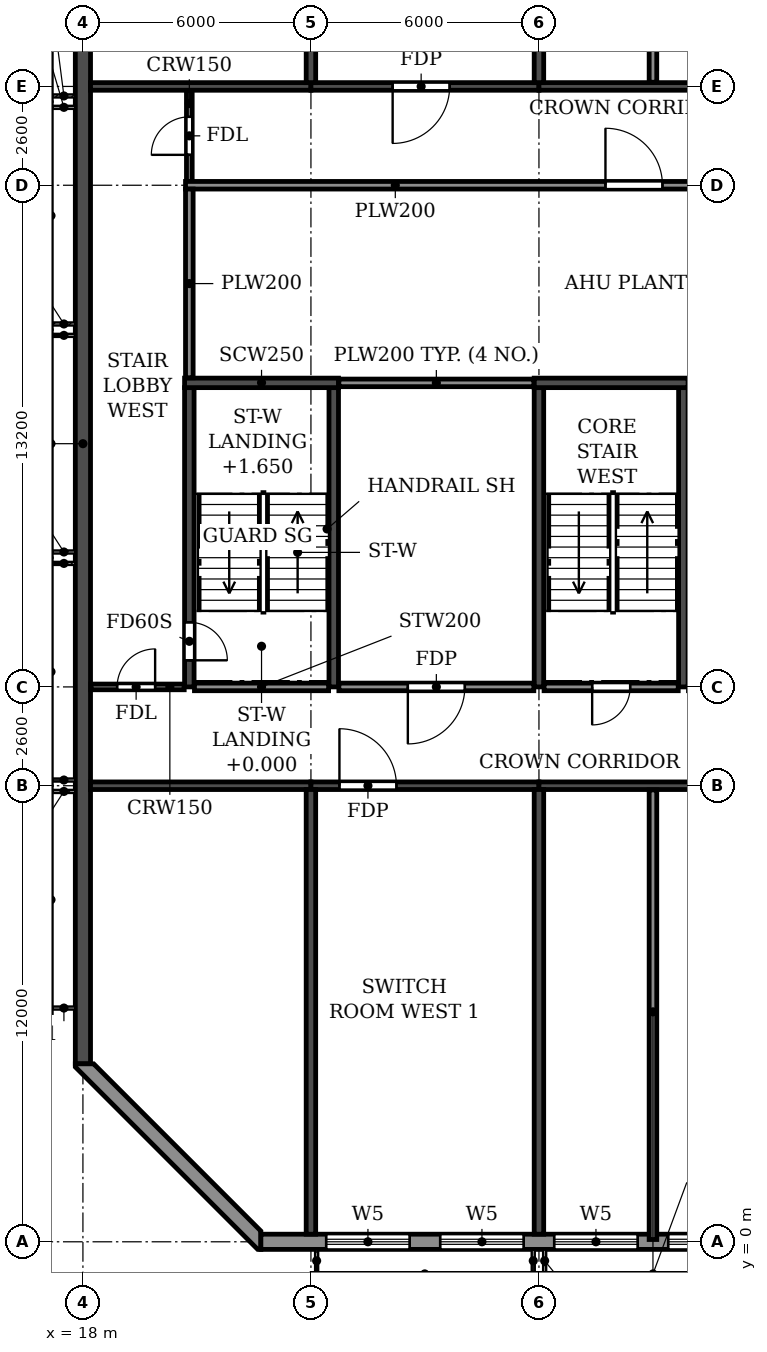
"""IFC4 building model, lengths in metres.
Left out: names, types, materials, properties, quantities, classifications, styles, units other than length and angle.
Written with IfcOpenShell. Run it as: python <this file> out.ifc"""

import sys

from ifc_helpers import new_model, si_unit, direction, frame, frame_2d, origin, place, context, subcontext, project, spatial, polyline, rectangle, outline, extrude, element, fill, save


model = new_model("IFC4")
c1 = context("Model", 3, precision=1e-05, world=origin(), true_north=direction((0.0, 1.0)))
c2 = subcontext(c1, "Body", "Model", "MODEL_VIEW")
j1 = project(units=[si_unit("LENGTHUNIT", "METRE"), si_unit("PLANEANGLEUNIT", "RADIAN")], contexts=[c1])
p1 = place(None, origin())
s1 = spatial("IfcSite", under=j1, at=p1, CompositionType="ELEMENT")
p2 = place(p1, origin())
s2 = spatial("IfcBuilding", under=s1, at=p2, CompositionType="ELEMENT")
p3 = place(p2, frame((0.0, 0.0, 282.3)))
s3 = spatial("IfcBuildingStorey", under=s2, at=p3, CompositionType="ELEMENT", Elevation=282.3)
p4 = place(p3, frame((24.0, 0.2, 0.0), z_axis=(0.0, 0.0, 1.0), x_axis=(0.0, 1.0, 0.0)))
e1 = element("IfcWall", 1, at=p4, inside=s3, PredefinedType="SHEAR", context=c2, shape_type="SweptSolid", body=[
    extrude(rectangle(XDim=11.7, YDim=0.25, at=frame_2d((5.85, 0.0))), origin(), (0.0, 0.0, 1.0), 3.05),
])
p5 = place(p3, frame((24.0, 30.5, 0.0), z_axis=(0.0, 0.0, 1.0), x_axis=(0.0, 1.0, 0.0)))
e2 = element("IfcWall", 2, at=p5, inside=s3, PredefinedType="SHEAR", context=c2, shape_type="SweptSolid", body=[
    extrude(rectangle(XDim=10.5, YDim=0.25, at=frame_2d((5.25, 0.0))), origin(), (0.0, 0.0, 1.0), 3.05),
])
p6 = place(p3, frame((30.0, 0.2, 0.0), z_axis=(0.0, 0.0, 1.0), x_axis=(0.0, 1.0, 0.0)))
e3 = element("IfcWall", 3, at=p6, inside=s3, PredefinedType="SHEAR", context=c2, shape_type="SweptSolid", body=[
    extrude(rectangle(XDim=11.7, YDim=0.25, at=frame_2d((5.85, 0.0))), origin(), (0.0, 0.0, 1.0), 3.05),
])
p7 = place(p3, frame((30.0, 30.5, 0.0), z_axis=(0.0, 0.0, 1.0), x_axis=(0.0, 1.0, 0.0)))
e4 = element("IfcWall", 4, at=p7, inside=s3, PredefinedType="SHEAR", context=c2, shape_type="SweptSolid", body=[
    extrude(rectangle(XDim=10.5, YDim=0.25, at=frame_2d((5.25, 0.0))), origin(), (0.0, 0.0, 1.0), 3.05),
])
p8 = place(p3, frame((18.0, 4.683, 0.0), z_axis=(0.0, 0.0, 1.0), x_axis=(0.0, 1.0, 0.0)))
e5 = element("IfcWall", 5, at=p8, inside=s3, PredefinedType="SHEAR", context=c2, shape_type="SweptSolid", body=[
    extrude(rectangle(XDim=31.834, YDim=0.4, at=frame_2d((15.917, 0.0))), origin(), (0.0, 0.0, 1.0), 3.05),
])
p9 = place(p3, frame((18.2, 12.0, 0.0), z_axis=(0.0, 0.0, 1.0), x_axis=(1.0, 0.0, 0.0)))
e6 = element("IfcWall", 6, at=p9, inside=s3, PredefinedType="SHEAR", context=c2, shape_type="SweptSolid", body=[
    extrude(rectangle(XDim=5.8, YDim=0.2, at=frame_2d((2.9, 0.0))), origin(), (0.0, 0.0, 1.0), 2.45),
])
p10 = place(p3, frame((24.0, 12.0, 0.0), z_axis=(0.0, 0.0, 1.0), x_axis=(1.0, 0.0, 0.0)))
e7 = element("IfcWall", 7, at=p10, inside=s3, PredefinedType="SHEAR", context=c2, shape_type="SweptSolid", body=[
    extrude(rectangle(XDim=6.0, YDim=0.2, at=frame_2d((3.0, 0.0))), origin(), (0.0, 0.0, 1.0), 2.45),
])
p11 = place(p10, frame((0.75, 0.0, 0.0)))
e8 = element("IfcOpeningElement", 8, at=p11, cuts=e7, PredefinedType="OPENING", context=c2, shape_type="SweptSolid", body=[
    extrude(rectangle(XDim=1.5, YDim=2.1, at=frame_2d((0.75, 1.05))), frame((0.0, 0.11, 0.0), z_axis=(0.0, -1.0, 0.0), x_axis=(1.0, 0.0, 0.0)), (0.0, 0.0, 1.0), 0.22),
])
p12 = place(p3, frame((30.0, 12.0, 0.0), z_axis=(0.0, 0.0, 1.0), x_axis=(1.0, 0.0, 0.0)))
e9 = element("IfcWall", 9, at=p12, inside=s3, PredefinedType="SHEAR", context=c2, shape_type="SweptSolid", body=[
    extrude(rectangle(XDim=6.0, YDim=0.2, at=frame_2d((3.0, 0.0))), origin(), (0.0, 0.0, 1.0), 2.45),
])
p13 = place(p3, frame((18.2, 30.4, 0.0), z_axis=(0.0, 0.0, 1.0), x_axis=(1.0, 0.0, 0.0)))
e10 = element("IfcWall", 10, at=p13, inside=s3, PredefinedType="SHEAR", context=c2, shape_type="SweptSolid", body=[
    extrude(rectangle(XDim=5.8, YDim=0.2, at=frame_2d((2.9, 0.0))), origin(), (0.0, 0.0, 1.0), 2.45),
])
p14 = place(p3, frame((24.0, 30.4, 0.0), z_axis=(0.0, 0.0, 1.0), x_axis=(1.0, 0.0, 0.0)))
e11 = element("IfcWall", 11, at=p14, inside=s3, PredefinedType="SHEAR", context=c2, shape_type="SweptSolid", body=[
    extrude(rectangle(XDim=6.0, YDim=0.2, at=frame_2d((3.0, 0.0))), origin(), (0.0, 0.0, 1.0), 2.45),
])
p15 = place(p14, frame((2.15, 0.0, 0.0)))
e12 = element("IfcOpeningElement", 12, at=p15, cuts=e11, PredefinedType="OPENING", context=c2, shape_type="SweptSolid", body=[
    extrude(rectangle(XDim=1.5, YDim=2.1, at=frame_2d((0.75, 1.05))), frame((0.0, 0.11, 0.0), z_axis=(0.0, -1.0, 0.0), x_axis=(1.0, 0.0, 0.0)), (0.0, 0.0, 1.0), 0.22),
])
p16 = place(p3, frame((30.0, 30.4, 0.0), z_axis=(0.0, 0.0, 1.0), x_axis=(1.0, 0.0, 0.0)))
e13 = element("IfcWall", 13, at=p16, inside=s3, PredefinedType="SHEAR", context=c2, shape_type="SweptSolid", body=[
    extrude(rectangle(XDim=6.0, YDim=0.2, at=frame_2d((3.0, 0.0))), origin(), (0.0, 0.0, 1.0), 2.45),
])
p17 = place(p3, frame((20.8, 14.6, 0.0), z_axis=(0.0, 0.0, 1.0), x_axis=(0.0, 1.0, 0.0)))
e14 = element("IfcWall", 14, at=p17, inside=s3, PredefinedType="SOLIDWALL", context=c2, shape_type="SweptSolid", body=[
    extrude(rectangle(XDim=7.875, YDim=0.25, at=frame_2d((3.938, 0.0))), origin(), (0.0, 0.0, 1.0), 3.05),
])
p18 = place(p17, frame((0.7, 0.0, 0.0)))
e15 = element("IfcOpeningElement", 15, at=p18, cuts=e14, PredefinedType="OPENING", context=c2, shape_type="SweptSolid", body=[
    extrude(rectangle(XDim=1.0, YDim=2.1, at=frame_2d((0.5, 1.05))), frame((0.0, 0.135, 0.0), z_axis=(0.0, -1.0, 0.0), x_axis=(1.0, 0.0, 0.0)), (0.0, 0.0, 1.0), 0.27),
])
p19 = place(p3, frame((24.6, 14.6, 0.0), z_axis=(0.0, 0.0, 1.0), x_axis=(0.0, 1.0, 0.0)))
e16 = element("IfcWall", 16, at=p19, inside=s3, PredefinedType="SOLIDWALL", context=c2, shape_type="SweptSolid", body=[
    extrude(rectangle(XDim=7.875, YDim=0.25, at=frame_2d((3.938, 0.0))), origin(), (0.0, 0.0, 1.0), 3.05),
])
p20 = place(p3, frame((20.675, 22.6, 0.0), z_axis=(0.0, 0.0, 1.0), x_axis=(1.0, 0.0, 0.0)))
e17 = element("IfcWall", 17, at=p20, inside=s3, PredefinedType="SOLIDWALL", context=c2, shape_type="SweptSolid", body=[
    extrude(rectangle(XDim=4.05, YDim=0.25, at=frame_2d((2.025, 0.0))), origin(), (0.0, 0.0, 1.0), 3.05),
])
for number, where, z_axis, x_axis in (
    (18, (30.0, 14.6, 0.0), (0.0, 0.0, 1.0), (0.0, 1.0, 0.0)),
    (19, (33.8, 14.6, 0.0), (0.0, 0.0, 1.0), (0.0, 1.0, 0.0)),
):
    element("IfcWall", number, at=place(p3, frame(where, z_axis=z_axis, x_axis=x_axis)), inside=s3, PredefinedType="SOLIDWALL", context=c2, shape_type="SweptSolid", body=[
        extrude(rectangle(XDim=7.875, YDim=0.25, at=frame_2d((3.938, 0.0))), origin(), (0.0, 0.0, 1.0), 3.05),
    ])
p21 = place(p3, frame((29.875, 22.6, 0.0), z_axis=(0.0, 0.0, 1.0), x_axis=(1.0, 0.0, 0.0)))
e20 = element("IfcWall", 20, at=p21, inside=s3, PredefinedType="SOLIDWALL", context=c2, shape_type="SweptSolid", body=[
    extrude(rectangle(XDim=4.05, YDim=0.25, at=frame_2d((2.025, 0.0))), origin(), (0.0, 0.0, 1.0), 3.05),
])
p22 = place(p3, frame((22.683, 0.0, 0.0), z_axis=(0.0, 0.0, 1.0), x_axis=(1.0, 0.0, 0.0)))
e21 = element("IfcWall", 21, at=p22, inside=s3, PredefinedType="STANDARD", context=c2, shape_type="SweptSolid", body=[
    extrude(rectangle(XDim=25.517, YDim=0.4, at=frame_2d((12.759, 0.0))), origin(), (0.0, 0.0, 1.0), 3.05),
])
p23 = place(p22, frame((1.717, 0.0, 0.6)))
e22 = element("IfcOpeningElement", 22, at=p23, cuts=e21, PredefinedType="OPENING", context=c2, shape_type="SweptSolid", body=[
    extrude(rectangle(XDim=2.2, YDim=2.4, at=frame_2d((1.1, 1.2))), frame((0.0, 0.21, 0.0), z_axis=(0.0, -1.0, 0.0), x_axis=(1.0, 0.0, 0.0)), (0.0, 0.0, 1.0), 0.42),
])
p24 = place(p22, frame((4.717, 0.0, 0.6)))
e23 = element("IfcOpeningElement", 23, at=p24, cuts=e21, PredefinedType="OPENING", context=c2, shape_type="SweptSolid", body=[
    extrude(rectangle(XDim=2.2, YDim=2.4, at=frame_2d((1.1, 1.2))), frame((0.0, 0.21, 0.0), z_axis=(0.0, -1.0, 0.0), x_axis=(1.0, 0.0, 0.0)), (0.0, 0.0, 1.0), 0.42),
])
p25 = place(p22, frame((7.717, 0.0, 0.6)))
e24 = element("IfcOpeningElement", 24, at=p25, cuts=e21, PredefinedType="OPENING", context=c2, shape_type="SweptSolid", body=[
    extrude(rectangle(XDim=2.2, YDim=2.4, at=frame_2d((1.1, 1.2))), frame((0.0, 0.21, 0.0), z_axis=(0.0, -1.0, 0.0), x_axis=(1.0, 0.0, 0.0)), (0.0, 0.0, 1.0), 0.42),
])
p26 = place(p22, frame((10.717, 0.0, 0.6)))
e25 = element("IfcOpeningElement", 25, at=p26, cuts=e21, PredefinedType="OPENING", context=c2, shape_type="SweptSolid", body=[
    extrude(rectangle(XDim=2.2, YDim=2.4, at=frame_2d((1.1, 1.2))), frame((0.0, 0.21, 0.0), z_axis=(0.0, -1.0, 0.0), x_axis=(1.0, 0.0, 0.0)), (0.0, 0.0, 1.0), 0.42),
])
p27 = place(p22, frame((13.717, 0.0, 0.6)))
e26 = element("IfcOpeningElement", 26, at=p27, cuts=e21, PredefinedType="OPENING", context=c2, shape_type="SweptSolid", body=[
    extrude(rectangle(XDim=2.2, YDim=2.4, at=frame_2d((1.1, 1.2))), frame((0.0, 0.21, 0.0), z_axis=(0.0, -1.0, 0.0), x_axis=(1.0, 0.0, 0.0)), (0.0, 0.0, 1.0), 0.42),
])
p28 = place(p22, frame((16.717, 0.0, 0.6)))
e27 = element("IfcOpeningElement", 27, at=p28, cuts=e21, PredefinedType="OPENING", context=c2, shape_type="SweptSolid", body=[
    extrude(rectangle(XDim=2.2, YDim=2.4, at=frame_2d((1.1, 1.2))), frame((0.0, 0.21, 0.0), z_axis=(0.0, -1.0, 0.0), x_axis=(1.0, 0.0, 0.0)), (0.0, 0.0, 1.0), 0.42),
])
p29 = place(p22, frame((19.717, 0.0, 0.6)))
e28 = element("IfcOpeningElement", 28, at=p29, cuts=e21, PredefinedType="OPENING", context=c2, shape_type="SweptSolid", body=[
    extrude(rectangle(XDim=2.2, YDim=2.4, at=frame_2d((1.1, 1.2))), frame((0.0, 0.21, 0.0), z_axis=(0.0, -1.0, 0.0), x_axis=(1.0, 0.0, 0.0)), (0.0, 0.0, 1.0), 0.42),
])
p30 = place(p22, frame((22.717, 0.0, 0.6)))
e29 = element("IfcOpeningElement", 29, at=p30, cuts=e21, PredefinedType="OPENING", context=c2, shape_type="SweptSolid", body=[
    extrude(rectangle(XDim=2.2, YDim=2.4, at=frame_2d((1.1, 1.2))), frame((0.0, 0.21, 0.0), z_axis=(0.0, -1.0, 0.0), x_axis=(1.0, 0.0, 0.0)), (0.0, 0.0, 1.0), 0.42),
])
p31 = place(p3, origin())
e30 = element("IfcWall", 30, at=p31, inside=s3, PredefinedType="STANDARD", context=c2, shape_type="SweptSolid", body=[
    extrude(outline(polyline([(17.8, 4.683), (17.8, 4.6), (22.6, -0.2), (22.683, -0.2), (22.683, 0.283), (18.283, 4.683), (17.8, 4.683)])), origin(), (0.0, 0.0, 1.0), 3.05),
])
p32 = place(p3, frame((18.21, 14.6, 0.0), z_axis=(0.0, 0.0, 1.0), x_axis=(1.0, 0.0, 0.0)))
e31 = element("IfcWall", 31, at=p32, inside=s3, PredefinedType="PARTITIONING", context=c2, shape_type="SweptSolid", body=[
    extrude(rectangle(XDim=2.455, YDim=0.15, at=frame_2d((1.228, 0.0))), origin(), (0.0, 0.0, 1.0), 3.05),
])
p33 = place(p32, frame((0.69, 0.0, 0.0)))
e32 = element("IfcOpeningElement", 32, at=p33, cuts=e31, PredefinedType="OPENING", context=c2, shape_type="SweptSolid", body=[
    extrude(rectangle(XDim=1.0, YDim=2.1, at=frame_2d((0.5, 1.05))), frame((0.0, 0.085, 0.0), z_axis=(0.0, -1.0, 0.0), x_axis=(1.0, 0.0, 0.0)), (0.0, 0.0, 1.0), 0.17),
])
p34 = place(p3, frame((20.8, 27.9, 0.0), z_axis=(0.0, 0.0, 1.0), x_axis=(0.0, 1.0, 0.0)))
e33 = element("IfcWall", 33, at=p34, inside=s3, PredefinedType="PARTITIONING", context=c2, shape_type="SweptSolid", body=[
    extrude(rectangle(XDim=2.39, YDim=0.15, at=frame_2d((1.195, 0.0))), origin(), (0.0, 0.0, 1.0), 3.05),
])
p35 = place(p34, frame((0.7, 0.0, 0.0)))
e34 = element("IfcOpeningElement", 34, at=p35, cuts=e33, PredefinedType="OPENING", context=c2, shape_type="SweptSolid", body=[
    extrude(rectangle(XDim=1.0, YDim=2.1, at=frame_2d((0.5, 1.05))), frame((0.0, 0.085, 0.0), z_axis=(0.0, -1.0, 0.0), x_axis=(1.0, 0.0, 0.0)), (0.0, 0.0, 1.0), 0.17),
])
p36 = place(p3, frame((24.735, 14.6, 0.0), z_axis=(0.0, 0.0, 1.0), x_axis=(1.0, 0.0, 0.0)))
e35 = element("IfcWall", 35, at=p36, inside=s3, PredefinedType="PARTITIONING", context=c2, shape_type="SweptSolid", body=[
    extrude(rectangle(XDim=5.13, YDim=0.2, at=frame_2d((2.565, 0.0))), origin(), (0.0, 0.0, 1.0), 3.05),
])
p37 = place(p36, frame((1.815, 0.0, 0.0)))
e36 = element("IfcOpeningElement", 36, at=p37, cuts=e35, PredefinedType="OPENING", context=c2, shape_type="SweptSolid", body=[
    extrude(rectangle(XDim=1.5, YDim=2.1, at=frame_2d((0.75, 1.05))), frame((0.0, 0.11, 0.0), z_axis=(0.0, -1.0, 0.0), x_axis=(1.0, 0.0, 0.0)), (0.0, 0.0, 1.0), 0.22),
])
p38 = place(p3, frame((24.735, 22.6, 0.0), z_axis=(0.0, 0.0, 1.0), x_axis=(1.0, 0.0, 0.0)))
e37 = element("IfcWall", 37, at=p38, inside=s3, PredefinedType="PARTITIONING", context=c2, shape_type="SweptSolid", body=[
    extrude(rectangle(XDim=5.13, YDim=0.2, at=frame_2d((2.565, 0.0))), origin(), (0.0, 0.0, 1.0), 3.05),
])
p39 = place(p3, frame((20.7, 27.8, 0.0), z_axis=(0.0, 0.0, 1.0), x_axis=(1.0, 0.0, 0.0)))
e38 = element("IfcWall", 38, at=p39, inside=s3, PredefinedType="PARTITIONING", context=c2, shape_type="SweptSolid", body=[
    extrude(rectangle(XDim=23.6, YDim=0.2, at=frame_2d((11.8, 0.0))), origin(), (0.0, 0.0, 1.0), 3.05),
])
p40 = place(p39, frame((11.05, 0.0, 0.0)))
e39 = element("IfcOpeningElement", 39, at=p40, cuts=e38, PredefinedType="OPENING", context=c2, shape_type="SweptSolid", body=[
    extrude(rectangle(XDim=1.5, YDim=2.1, at=frame_2d((0.75, 1.05))), frame((0.0, 0.11, 0.0), z_axis=(0.0, -1.0, 0.0), x_axis=(1.0, 0.0, 0.0)), (0.0, 0.0, 1.0), 0.22),
])
p41 = place(p3, frame((20.8, 22.735, 0.0), z_axis=(0.0, 0.0, 1.0), x_axis=(0.0, 1.0, 0.0)))
e40 = element("IfcWall", 40, at=p41, inside=s3, PredefinedType="PARTITIONING", context=c2, shape_type="SweptSolid", body=[
    extrude(rectangle(XDim=4.965, YDim=0.2, at=frame_2d((2.482, 0.0))), origin(), (0.0, 0.0, 1.0), 3.05),
])
p42 = place(p3, frame((33.0, 0.06, 0.0), z_axis=(0.0, 0.0, 1.0), x_axis=(0.0, 1.0, 0.0)))
e41 = element("IfcWall", 41, at=p42, inside=s3, PredefinedType="PARTITIONING", context=c2, shape_type="SweptSolid", body=[
    extrude(rectangle(XDim=11.83, YDim=0.2, at=frame_2d((5.915, 0.0))), origin(), (0.0, 0.0, 1.0), 3.05),
])
p43 = place(p3, frame((33.0, 30.51, 0.0), z_axis=(0.0, 0.0, 1.0), x_axis=(0.0, 1.0, 0.0)))
e42 = element("IfcWall", 42, at=p43, inside=s3, PredefinedType="PARTITIONING", context=c2, shape_type="SweptSolid", body=[
    extrude(rectangle(XDim=10.63, YDim=0.2, at=frame_2d((5.315, 0.0))), origin(), (0.0, 0.0, 1.0), 3.05),
])
p44 = place(p3, frame((20.935, 14.6, 0.0), z_axis=(0.0, 0.0, 1.0), x_axis=(1.0, 0.0, 0.0)))
e43 = element("IfcWall", 43, at=p44, inside=s3, PredefinedType="PARTITIONING", context=c2, shape_type="SweptSolid", body=[
    extrude(rectangle(XDim=3.53, YDim=0.2, at=frame_2d((1.765, 0.0))), origin(), (0.0, 0.0, 1.0), 3.05),
])
p45 = place(p3, frame((30.135, 14.6, 0.0), z_axis=(0.0, 0.0, 1.0), x_axis=(1.0, 0.0, 0.0)))
e44 = element("IfcWall", 44, at=p45, inside=s3, PredefinedType="PARTITIONING", context=c2, shape_type="SweptSolid", body=[
    extrude(rectangle(XDim=3.53, YDim=0.2, at=frame_2d((1.765, 0.0))), origin(), (0.0, 0.0, 1.0), 3.05),
])
p46 = place(p45, frame((1.265, 0.0, 0.0)))
e45 = element("IfcOpeningElement", 45, at=p46, cuts=e44, PredefinedType="OPENING", context=c2, shape_type="SweptSolid", body=[
    extrude(rectangle(XDim=1.0, YDim=2.1, at=frame_2d((0.5, 1.05))), frame((0.0, 0.11, 0.0), z_axis=(0.0, -1.0, 0.0), x_axis=(1.0, 0.0, 0.0)), (0.0, 0.0, 1.0), 0.22),
])
p47 = place(p23, origin())
e46 = element("IfcWindow", 46, at=p47, inside=s3, PartitioningType="TRIPLE_PANEL_HORIZONTAL", PredefinedType="WINDOW", context=c2, shape_type="SweptSolid", body=[
    extrude(rectangle(XDim=2.2, YDim=2.4, at=frame_2d((1.1, 1.2))), frame((0.0, 0.03, 0.0), z_axis=(0.0, -1.0, 0.0), x_axis=(1.0, 0.0, 0.0)), (0.0, 0.0, 1.0), 0.06),
])
fill(e22, e46)
p48 = place(p24, origin())
e47 = element("IfcWindow", 47, at=p48, inside=s3, PartitioningType="TRIPLE_PANEL_HORIZONTAL", PredefinedType="WINDOW", context=c2, shape_type="SweptSolid", body=[
    extrude(rectangle(XDim=2.2, YDim=2.4, at=frame_2d((1.1, 1.2))), frame((0.0, 0.03, 0.0), z_axis=(0.0, -1.0, 0.0), x_axis=(1.0, 0.0, 0.0)), (0.0, 0.0, 1.0), 0.06),
])
fill(e23, e47)
p49 = place(p25, origin())
e48 = element("IfcWindow", 48, at=p49, inside=s3, PartitioningType="TRIPLE_PANEL_HORIZONTAL", PredefinedType="WINDOW", context=c2, shape_type="SweptSolid", body=[
    extrude(rectangle(XDim=2.2, YDim=2.4, at=frame_2d((1.1, 1.2))), frame((0.0, 0.03, 0.0), z_axis=(0.0, -1.0, 0.0), x_axis=(1.0, 0.0, 0.0)), (0.0, 0.0, 1.0), 0.06),
])
fill(e24, e48)
p50 = place(p26, origin())
e49 = element("IfcWindow", 49, at=p50, inside=s3, PartitioningType="TRIPLE_PANEL_HORIZONTAL", PredefinedType="WINDOW", context=c2, shape_type="SweptSolid", body=[
    extrude(rectangle(XDim=2.2, YDim=2.4, at=frame_2d((1.1, 1.2))), frame((0.0, 0.03, 0.0), z_axis=(0.0, -1.0, 0.0), x_axis=(1.0, 0.0, 0.0)), (0.0, 0.0, 1.0), 0.06),
])
fill(e25, e49)
p51 = place(p15, frame((1.5, 0.0, 0.0), z_axis=(0.0, 0.0, 1.0), x_axis=(-1.0, 0.0, 0.0)))
e50 = element("IfcDoor", 50, at=p51, inside=s3, OperationType="DOUBLE_DOOR_SINGLE_SWING", PredefinedType="DOOR", context=c2, shape_type="SweptSolid", body=[
    extrude(rectangle(XDim=1.5, YDim=2.1, at=frame_2d((0.75, 1.05))), frame((0.0, 0.025, 0.0), z_axis=(0.0, -1.0, 0.0), x_axis=(1.0, 0.0, 0.0)), (0.0, 0.0, 1.0), 0.05),
])
fill(e12, e50)
p52 = place(p40, origin())
e51 = element("IfcDoor", 51, at=p52, inside=s3, OperationType="DOUBLE_DOOR_SINGLE_SWING", PredefinedType="DOOR", context=c2, shape_type="SweptSolid", body=[
    extrude(rectangle(XDim=1.5, YDim=2.1, at=frame_2d((0.75, 1.05))), frame((0.0, 0.025, 0.0), z_axis=(0.0, -1.0, 0.0), x_axis=(1.0, 0.0, 0.0)), (0.0, 0.0, 1.0), 0.05),
])
fill(e39, e51)
p53 = place(p11, origin())
e52 = element("IfcDoor", 52, at=p53, inside=s3, OperationType="DOUBLE_DOOR_SINGLE_SWING", PredefinedType="DOOR", context=c2, shape_type="SweptSolid", body=[
    extrude(rectangle(XDim=1.5, YDim=2.1, at=frame_2d((0.75, 1.05))), frame((0.0, 0.025, 0.0), z_axis=(0.0, -1.0, 0.0), x_axis=(1.0, 0.0, 0.0)), (0.0, 0.0, 1.0), 0.05),
])
fill(e8, e52)
p54 = place(p37, frame((1.5, 0.0, 0.0), z_axis=(0.0, 0.0, 1.0), x_axis=(-1.0, 0.0, 0.0)))
e53 = element("IfcDoor", 53, at=p54, inside=s3, OperationType="DOUBLE_DOOR_SINGLE_SWING", PredefinedType="DOOR", context=c2, shape_type="SweptSolid", body=[
    extrude(rectangle(XDim=1.5, YDim=2.1, at=frame_2d((0.75, 1.05))), frame((0.0, 0.025, 0.0), z_axis=(0.0, -1.0, 0.0), x_axis=(1.0, 0.0, 0.0)), (0.0, 0.0, 1.0), 0.05),
])
fill(e36, e53)
p55 = place(p33, origin())
e54 = element("IfcDoor", 54, at=p55, inside=s3, OperationType="SINGLE_SWING_RIGHT", PredefinedType="DOOR", context=c2, shape_type="SweptSolid", body=[
    extrude(rectangle(XDim=1.0, YDim=2.1, at=frame_2d((0.5, 1.05))), frame((0.0, 0.025, 0.0), z_axis=(0.0, -1.0, 0.0), x_axis=(1.0, 0.0, 0.0)), (0.0, 0.0, 1.0), 0.05),
])
fill(e32, e54)
p56 = place(p18, frame((1.0, 0.0, 0.0), z_axis=(0.0, 0.0, 1.0), x_axis=(-1.0, 0.0, 0.0)))
e55 = element("IfcDoor", 55, at=p56, inside=s3, OperationType="SINGLE_SWING_RIGHT", PredefinedType="DOOR", context=c2, shape_type="SweptSolid", body=[
    extrude(rectangle(XDim=1.0, YDim=2.1, at=frame_2d((0.5, 1.05))), frame((0.0, 0.025, 0.0), z_axis=(0.0, -1.0, 0.0), x_axis=(1.0, 0.0, 0.0)), (0.0, 0.0, 1.0), 0.05),
])
fill(e15, e55)
p57 = place(p35, origin())
e56 = element("IfcDoor", 56, at=p57, inside=s3, OperationType="SINGLE_SWING_LEFT", PredefinedType="DOOR", context=c2, shape_type="SweptSolid", body=[
    extrude(rectangle(XDim=1.0, YDim=2.1, at=frame_2d((0.5, 1.05))), frame((0.0, 0.025, 0.0), z_axis=(0.0, -1.0, 0.0), x_axis=(1.0, 0.0, 0.0)), (0.0, 0.0, 1.0), 0.05),
])
fill(e34, e56)
p58 = place(p46, frame((1.0, 0.0, 0.0), z_axis=(0.0, 0.0, 1.0), x_axis=(-1.0, 0.0, 0.0)))
e57 = element("IfcDoor", 57, at=p58, inside=s3, OperationType="SINGLE_SWING_RIGHT", PredefinedType="DOOR", context=c2, shape_type="SweptSolid", body=[
    extrude(rectangle(XDim=1.0, YDim=2.1, at=frame_2d((0.5, 1.05))), frame((0.0, 0.025, 0.0), z_axis=(0.0, -1.0, 0.0), x_axis=(1.0, 0.0, 0.0)), (0.0, 0.0, 1.0), 0.05),
])
fill(e45, e57)
save(model, sys.argv[1])
